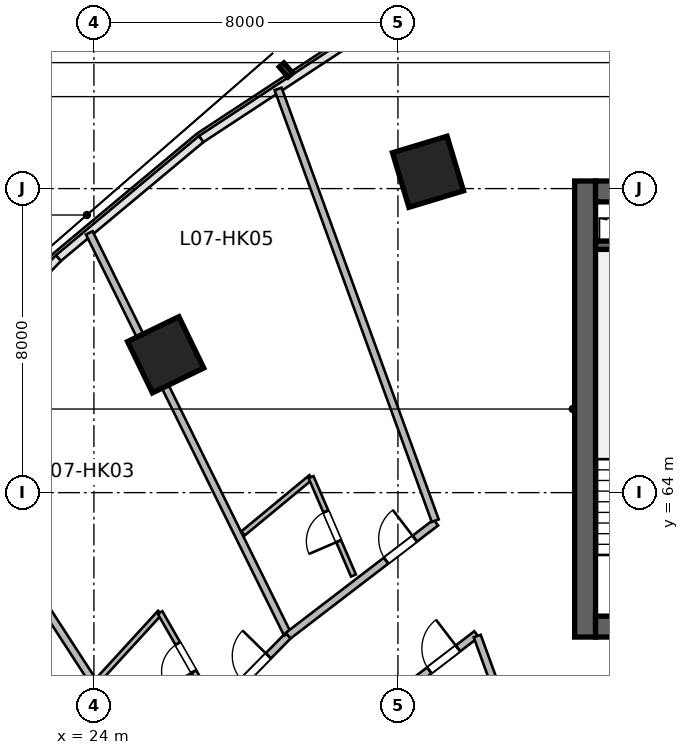
"""IFC4 building model, lengths in metres.
Left out: names, types, materials, properties, quantities, classifications, styles, units other than length and angle.
Written with IfcOpenShell. Run it as: python <this file> out.ifc"""

import sys

from ifc_helpers import new_model, si_unit, direction, frame, frame_2d, origin, origin_2d, place, context, subcontext, project, spatial, rectangle, extrude, source, transform, mapped, element, fill, save


model = new_model("IFC4")
c1 = context("Model", 3, precision=1e-05, world=origin(), true_north=direction((0.0, 1.0)))
c2 = subcontext(c1, "Body", "Model", "MODEL_VIEW")
j1 = project(units=[si_unit("LENGTHUNIT", "METRE"), si_unit("PLANEANGLEUNIT", "RADIAN")], contexts=[c1])
p1 = place(None, origin())
s1 = spatial("IfcSite", under=j1, at=p1, CompositionType="ELEMENT")
p2 = place(p1, origin())
s2 = spatial("IfcBuilding", under=s1, at=p2, CompositionType="ELEMENT")
p3 = place(p2, frame((0.0, 0.0, 39.0)))
s3 = spatial("IfcBuildingStorey", under=s2, at=p3, CompositionType="ELEMENT", Elevation=39.0)
m1 = source(origin(), c2, "Body", "SweptSolid", [
    extrude(rectangle(XDim=12.0, YDim=0.55, at=frame_2d((6.0, 0.0))), origin(), (0.0, 0.0, 1.0), 3.6),
])
p4 = place(p3, frame((36.925, 60.2, 0.0), z_axis=(0.0, 0.0, 1.0), x_axis=(0.0, 1.0, 0.0)))
e1 = element("IfcWall", 1, at=p4, inside=s3, PredefinedType="SHEAR", context=c2, shape_type="MappedRepresentation", body=[
    mapped(m1, transform((0.0, 0.0, 0.0), scale=1.0)),
])
m2 = source(origin(), c2, "Body", "SweptSolid", [
    extrude(rectangle(XDim=21.6, YDim=0.55, at=frame_2d((10.8, 0.0))), origin(), (0.0, 0.0, 1.0), 3.6),
])
p5 = place(p3, frame((37.2, 60.475, 0.0), z_axis=(0.0, 0.0, 1.0), x_axis=(1.0, 0.0, 0.0)))
e2 = element("IfcWall", 2, at=p5, inside=s3, PredefinedType="SHEAR", context=c2, shape_type="MappedRepresentation", body=[
    mapped(m2, transform((0.0, 0.0, 0.0), scale=1.0)),
])
p6 = place(p5, frame((1.1, 0.0, 0.0)))
e3 = element("IfcOpeningElement", 3, at=p6, cuts=e2, PredefinedType="OPENING", context=c2, shape_type="SweptSolid", body=[
    extrude(rectangle(XDim=1.15, YDim=2.15, at=frame_2d((0.575, 1.075))), frame((0.0, 0.285, 0.0), z_axis=(0.0, -1.0, 0.0), x_axis=(1.0, 0.0, 0.0)), (0.0, 0.0, 1.0), 0.57),
])
p7 = place(p5, frame((19.5, 0.0, 0.0)))
e4 = element("IfcOpeningElement", 4, at=p7, cuts=e2, PredefinedType="OPENING", context=c2, shape_type="SweptSolid", body=[
    extrude(rectangle(XDim=0.9, YDim=2.1, at=frame_2d((0.45, 1.05))), frame((0.0, 0.285, 0.0), z_axis=(0.0, -1.0, 0.0), x_axis=(1.0, 0.0, 0.0)), (0.0, 0.0, 1.0), 0.57),
])
p8 = place(p5, frame((12.02, 0.0, 0.0)))
e5 = element("IfcOpeningElement", 5, at=p8, cuts=e2, PredefinedType="OPENING", context=c2, shape_type="SweptSolid", body=[
    extrude(rectangle(XDim=1.6, YDim=2.15, at=frame_2d((0.8, 1.075))), frame((0.0, 0.285, 0.0), z_axis=(0.0, -1.0, 0.0), x_axis=(1.0, 0.0, 0.0)), (0.0, 0.0, 1.0), 0.57),
])
p9 = place(p3, frame((37.2, 71.925, 0.0), z_axis=(0.0, 0.0, 1.0), x_axis=(1.0, 0.0, 0.0)))
e6 = element("IfcWall", 6, at=p9, inside=s3, PredefinedType="SHEAR", context=c2, shape_type="MappedRepresentation", body=[
    mapped(m2, transform((0.0, 0.0, 0.0), scale=1.0)),
])
p10 = place(p9, frame((1.2, 0.0, 0.0)))
e7 = element("IfcOpeningElement", 7, at=p10, cuts=e6, PredefinedType="OPENING", context=c2, shape_type="SweptSolid", body=[
    extrude(rectangle(XDim=0.9, YDim=2.1, at=frame_2d((0.45, 1.05))), frame((0.0, 0.285, 0.0), z_axis=(0.0, -1.0, 0.0), x_axis=(1.0, 0.0, 0.0)), (0.0, 0.0, 1.0), 0.57),
])
p11 = place(p9, frame((14.7, 0.0, 0.0)))
e8 = element("IfcOpeningElement", 8, at=p11, cuts=e6, PredefinedType="OPENING", context=c2, shape_type="SweptSolid", body=[
    extrude(rectangle(XDim=1.2, YDim=2.15, at=frame_2d((0.6, 1.075))), frame((0.0, 0.285, 0.0), z_axis=(0.0, -1.0, 0.0), x_axis=(1.0, 0.0, 0.0)), (0.0, 0.0, 1.0), 0.57),
])
p12 = place(p9, frame((4.15, 0.0, 0.0)))
e9 = element("IfcOpeningElement", 9, at=p12, cuts=e6, PredefinedType="OPENING", context=c2, shape_type="SweptSolid", body=[
    extrude(rectangle(XDim=1.3, YDim=2.15, at=frame_2d((0.65, 1.075))), frame((0.0, 0.285, 0.0), z_axis=(0.0, -1.0, 0.0), x_axis=(1.0, 0.0, 0.0)), (0.0, 0.0, 1.0), 0.57),
])
p13 = place(p9, frame((7.1, 0.0, 0.0)))
e10 = element("IfcOpeningElement", 10, at=p13, cuts=e6, PredefinedType="OPENING", context=c2, shape_type="SweptSolid", body=[
    extrude(rectangle(XDim=0.9, YDim=2.1, at=frame_2d((0.45, 1.05))), frame((0.0, 0.285, 0.0), z_axis=(0.0, -1.0, 0.0), x_axis=(1.0, 0.0, 0.0)), (0.0, 0.0, 1.0), 0.57),
])
m3 = source(origin(), c2, "Body", "SweptSolid", [
    extrude(rectangle(XDim=3.27, YDim=0.22, at=frame_2d((1.635, 0.0))), origin(), (0.0, 0.0, 1.0), 3.6),
])
p14 = place(p3, frame((37.2, 70.51, 0.0), z_axis=(0.0, 0.0, 1.0), x_axis=(1.0, 0.0, 0.0)))
e11 = element("IfcWall", 11, at=p14, inside=s3, PredefinedType="SHEAR", context=c2, shape_type="MappedRepresentation", body=[
    mapped(m3, transform((0.0, 0.0, 0.0), scale=1.0)),
])
m4 = source(origin(), c2, "Body", "SweptSolid", [
    extrude(rectangle(XDim=1.5, YDim=1.5, at=origin_2d()), origin(), (0.0, 0.0, 1.0), 3.6),
])
for number, where, z_axis, x_axis in (
    (12, (25.888, 67.627, 0.0), (0.0, 0.0, 1.0), (-0.436, 0.9, 0.0)),
    (13, (32.791, 72.442, 0.0), (0.0, 0.0, 1.0), (-0.289, 0.957, 0.0)),
):
    element("IfcColumn", number, at=place(p3, frame(where, z_axis=z_axis, x_axis=x_axis)), inside=s3, PredefinedType="COLUMN", context=c2, shape_type="MappedRepresentation", body=[
        mapped(m4, transform((0.0, 0.0, 0.0), scale=1.0)),
    ])
m5 = source(origin(), c2, "Body", "SweptSolid", [
    extrude(rectangle(XDim=11.403, YDim=0.195, at=frame_2d((5.701, 0.0))), origin(), (0.0, 0.0, 1.0), 3.36),
])
p15 = place(p3, frame((25.523, 56.647, 0.0), z_axis=(0.0, 0.0, 1.0), x_axis=(-0.544246090008, 0.838925618581, 0.0)))
e14 = element("IfcWall", 14, at=p15, inside=s3, PredefinedType="PARTITIONING", context=c2, shape_type="MappedRepresentation", body=[
    mapped(m5, transform((0.0, 0.0, 0.0), scale=1.0)),
])
m6 = source(origin(), c2, "Body", "SweptSolid", [
    extrude(rectangle(XDim=5.087, YDim=0.195, at=frame_2d((2.543, 0.0))), origin(), (0.0, 0.0, 1.0), 3.36),
])
p16 = place(p3, frame((25.55, 56.607, 0.0), z_axis=(0.0, 0.0, 1.0), x_axis=(0.700428330775, 0.7137227427, 0.0)))
e15 = element("IfcWall", 15, at=p16, inside=s3, PredefinedType="PARTITIONING", context=c2, shape_type="MappedRepresentation", body=[
    mapped(m6, transform((0.0, 0.0, 0.0), scale=1.0)),
])
p17 = place(p16, frame((3.391, 0.0, 0.0)))
e16 = element("IfcOpeningElement", 16, at=p17, cuts=e15, PredefinedType="OPENING", context=c2, shape_type="SweptSolid", body=[
    extrude(rectangle(XDim=0.95, YDim=2.15, at=frame_2d((0.475, 1.075))), frame((0.0, 0.107, 0.0), z_axis=(0.0, -1.0, 0.0), x_axis=(1.0, 0.0, 0.0)), (0.0, 0.0, 1.0), 0.215),
])
m7 = source(origin(), c2, "Body", "SweptSolid", [
    extrude(rectangle(XDim=11.77, YDim=0.195, at=frame_2d((5.885, 0.0))), origin(), (0.0, 0.0, 1.0), 3.36),
])
p18 = place(p3, frame((29.091, 60.282, 0.0), z_axis=(0.0, 0.0, 1.0), x_axis=(-0.44286060326, 0.896590478468, 0.0)))
e17 = element("IfcWall", 17, at=p18, inside=s3, PredefinedType="PARTITIONING", context=c2, shape_type="MappedRepresentation", body=[
    mapped(m7, transform((0.0, 0.0, 0.0), scale=1.0)),
])
m8 = source(origin(), c2, "Body", "SweptSolid", [
    extrude(rectangle(XDim=2.416, YDim=0.14, at=frame_2d((1.208, 0.0))), origin(), (0.0, 0.0, 1.0), 3.36),
])
p19 = place(p3, frame((24.108, 59.064, 0.0), z_axis=(0.0, 0.0, 1.0), x_axis=(0.675399637907, 0.737451916476, 0.0)))
e18 = element("IfcWall", 18, at=p19, inside=s3, PredefinedType="PARTITIONING", context=c2, shape_type="MappedRepresentation", body=[
    mapped(m8, transform((0.0, 0.0, 0.0), scale=1.0)),
])
m9 = source(origin(), c2, "Body", "SweptSolid", [
    extrude(rectangle(XDim=2.732, YDim=0.14, at=frame_2d((1.366, 0.0))), origin(), (0.0, 0.0, 1.0), 3.36),
])
p20 = place(p3, frame((27.098, 58.476, 0.0), z_axis=(0.0, 0.0, 1.0), x_axis=(-0.497254966372, 0.867604459658, 0.0)))
e19 = element("IfcWall", 19, at=p20, inside=s3, PredefinedType="PARTITIONING", context=c2, shape_type="MappedRepresentation", body=[
    mapped(m9, transform((0.0, 0.0, 0.0), scale=1.0)),
])
p21 = place(p20, frame((0.941, 0.0, 0.0)))
e20 = element("IfcOpeningElement", 20, at=p21, cuts=e19, PredefinedType="OPENING", context=c2, shape_type="SweptSolid", body=[
    extrude(rectangle(XDim=0.85, YDim=2.05, at=frame_2d((0.425, 1.025))), frame((0.0, 0.08, 0.0), z_axis=(0.0, -1.0, 0.0), x_axis=(1.0, 0.0, 0.0)), (0.0, 0.0, 1.0), 0.16),
])
m10 = source(origin(), c2, "Body", "SweptSolid", [
    extrude(rectangle(XDim=4.895, YDim=0.195, at=frame_2d((2.447, 0.0))), origin(), (0.0, 0.0, 1.0), 3.36),
])
p22 = place(p3, frame((29.113, 60.238, 0.0), z_axis=(0.0, 0.0, 1.0), x_axis=(0.793896075849, 0.608053468661, 0.0)))
e21 = element("IfcWall", 21, at=p22, inside=s3, PredefinedType="PARTITIONING", context=c2, shape_type="MappedRepresentation", body=[
    mapped(m10, transform((0.0, 0.0, 0.0), scale=1.0)),
])
p23 = place(p22, frame((3.245, 0.0, 0.0)))
e22 = element("IfcOpeningElement", 22, at=p23, cuts=e21, PredefinedType="OPENING", context=c2, shape_type="SweptSolid", body=[
    extrude(rectangle(XDim=0.95, YDim=2.15, at=frame_2d((0.475, 1.075))), frame((0.0, 0.107, 0.0), z_axis=(0.0, -1.0, 0.0), x_axis=(1.0, 0.0, 0.0)), (0.0, 0.0, 1.0), 0.215),
])
m11 = source(origin(), c2, "Body", "SweptSolid", [
    extrude(rectangle(XDim=12.088, YDim=0.195, at=frame_2d((6.044, 0.0))), origin(), (0.0, 0.0, 1.0), 3.36),
])
p24 = place(p3, frame((32.981, 63.262, 0.0), z_axis=(0.0, 0.0, 1.0), x_axis=(-0.34203007529, 0.939689005787, 0.0)))
e23 = element("IfcWall", 23, at=p24, inside=s3, PredefinedType="PARTITIONING", context=c2, shape_type="MappedRepresentation", body=[
    mapped(m11, transform((0.0, 0.0, 0.0), scale=1.0)),
])
m12 = source(origin(), c2, "Body", "SweptSolid", [
    extrude(rectangle(XDim=2.324, YDim=0.14, at=frame_2d((1.162, 0.0))), origin(), (0.0, 0.0, 1.0), 3.36),
])
p25 = place(p3, frame((27.923, 62.926, 0.0), z_axis=(0.0, 0.0, 1.0), x_axis=(0.770746444956, 0.637141991701, 0.0)))
e24 = element("IfcWall", 24, at=p25, inside=s3, PredefinedType="PARTITIONING", context=c2, shape_type="MappedRepresentation", body=[
    mapped(m12, transform((0.0, 0.0, 0.0), scale=1.0)),
])
m13 = source(origin(), c2, "Body", "SweptSolid", [
    extrude(rectangle(XDim=2.818, YDim=0.14, at=frame_2d((1.409, 0.0))), origin(), (0.0, 0.0, 1.0), 3.36),
])
p26 = place(p3, frame((30.83, 61.819, 0.0), z_axis=(0.0, 0.0, 1.0), x_axis=(-0.395894859341, 0.918295845764, 0.0)))
e25 = element("IfcWall", 25, at=p26, inside=s3, PredefinedType="PARTITIONING", context=c2, shape_type="MappedRepresentation", body=[
    mapped(m13, transform((0.0, 0.0, 0.0), scale=1.0)),
])
p27 = place(p26, frame((0.984, 0.0, 0.0)))
e26 = element("IfcOpeningElement", 26, at=p27, cuts=e25, PredefinedType="OPENING", context=c2, shape_type="SweptSolid", body=[
    extrude(rectangle(XDim=0.85, YDim=2.05, at=frame_2d((0.425, 1.025))), frame((0.0, 0.08, 0.0), z_axis=(0.0, -1.0, 0.0), x_axis=(1.0, 0.0, 0.0)), (0.0, 0.0, 1.0), 0.16),
])
m14 = source(origin(), c2, "Body", "SweptSolid", [
    extrude(rectangle(XDim=4.546, YDim=0.195, at=frame_2d((2.273, 0.0))), origin(), (0.0, 0.0, 1.0), 3.36),
])
p28 = place(p3, frame((30.459, 57.511, 0.0), z_axis=(0.0, 0.0, 1.0), x_axis=(0.793907931297, 0.608037989457, 0.0)))
e27 = element("IfcWall", 27, at=p28, inside=s3, PredefinedType="PARTITIONING", context=c2, shape_type="MappedRepresentation", body=[
    mapped(m14, transform((0.0, 0.0, 0.0), scale=1.0)),
])
p29 = place(p28, frame((2.98, 0.0, 0.0)))
e28 = element("IfcOpeningElement", 28, at=p29, cuts=e27, PredefinedType="OPENING", context=c2, shape_type="SweptSolid", body=[
    extrude(rectangle(XDim=0.95, YDim=2.15, at=frame_2d((0.475, 1.075))), frame((0.0, 0.107, 0.0), z_axis=(0.0, -1.0, 0.0), x_axis=(1.0, 0.0, 0.0)), (0.0, 0.0, 1.0), 0.215),
])
m15 = source(origin(), c2, "Body", "SweptSolid", [
    extrude(rectangle(XDim=12.196, YDim=0.195, at=frame_2d((6.098, 0.0))), origin(), (0.0, 0.0, 1.0), 3.36),
])
p30 = place(p3, frame((38.258, 48.766, 0.0), z_axis=(0.0, 0.0, 1.0), x_axis=(-0.342022711534, 0.939691686031, 0.0)))
e29 = element("IfcWall", 29, at=p30, inside=s3, PredefinedType="PARTITIONING", context=c2, shape_type="MappedRepresentation", body=[
    mapped(m15, transform((0.0, 0.0, 0.0), scale=1.0)),
])
m16 = source(origin(), c2, "Body", "SweptSolid", [
    extrude(rectangle(XDim=0.95, YDim=2.15, at=frame_2d((0.475, 1.075))), frame((0.0, 0.025, 0.0), z_axis=(0.0, -1.0, 0.0), x_axis=(1.0, 0.0, 0.0)), (0.0, 0.0, 1.0), 0.05),
])
p31 = place(p17, origin())
e30 = element("IfcDoor", 30, at=p31, inside=s3, OperationType="SINGLE_SWING_RIGHT", PredefinedType="DOOR", context=c2, shape_type="MappedRepresentation", body=[
    mapped(m16, transform((0.0, 0.0, 0.0), scale=1.0)),
])
fill(e16, e30)
m17 = source(origin(), c2, "Body", "SweptSolid", [
    extrude(rectangle(XDim=0.85, YDim=2.05, at=frame_2d((0.425, 1.025))), frame((0.0, 0.025, 0.0), z_axis=(0.0, -1.0, 0.0), x_axis=(1.0, 0.0, 0.0)), (0.0, 0.0, 1.0), 0.05),
])
p32 = place(p21, origin())
e31 = element("IfcDoor", 31, at=p32, inside=s3, OperationType="SINGLE_SWING_LEFT", PredefinedType="DOOR", context=c2, shape_type="MappedRepresentation", body=[
    mapped(m17, transform((0.0, 0.0, 0.0), scale=1.0)),
])
fill(e20, e31)
p33 = place(p23, origin())
e32 = element("IfcDoor", 32, at=p33, inside=s3, OperationType="SINGLE_SWING_RIGHT", PredefinedType="DOOR", context=c2, shape_type="MappedRepresentation", body=[
    mapped(m16, transform((0.0, 0.0, 0.0), scale=1.0)),
])
fill(e22, e32)
p34 = place(p27, origin())
e33 = element("IfcDoor", 33, at=p34, inside=s3, OperationType="SINGLE_SWING_LEFT", PredefinedType="DOOR", context=c2, shape_type="MappedRepresentation", body=[
    mapped(m17, transform((0.0, 0.0, 0.0), scale=1.0)),
])
fill(e26, e33)
p35 = place(p29, origin())
e34 = element("IfcDoor", 34, at=p35, inside=s3, OperationType="SINGLE_SWING_RIGHT", PredefinedType="DOOR", context=c2, shape_type="MappedRepresentation", body=[
    mapped(m16, transform((0.0, 0.0, 0.0), scale=1.0)),
])
fill(e28, e34)
save(model, sys.argv[1])
